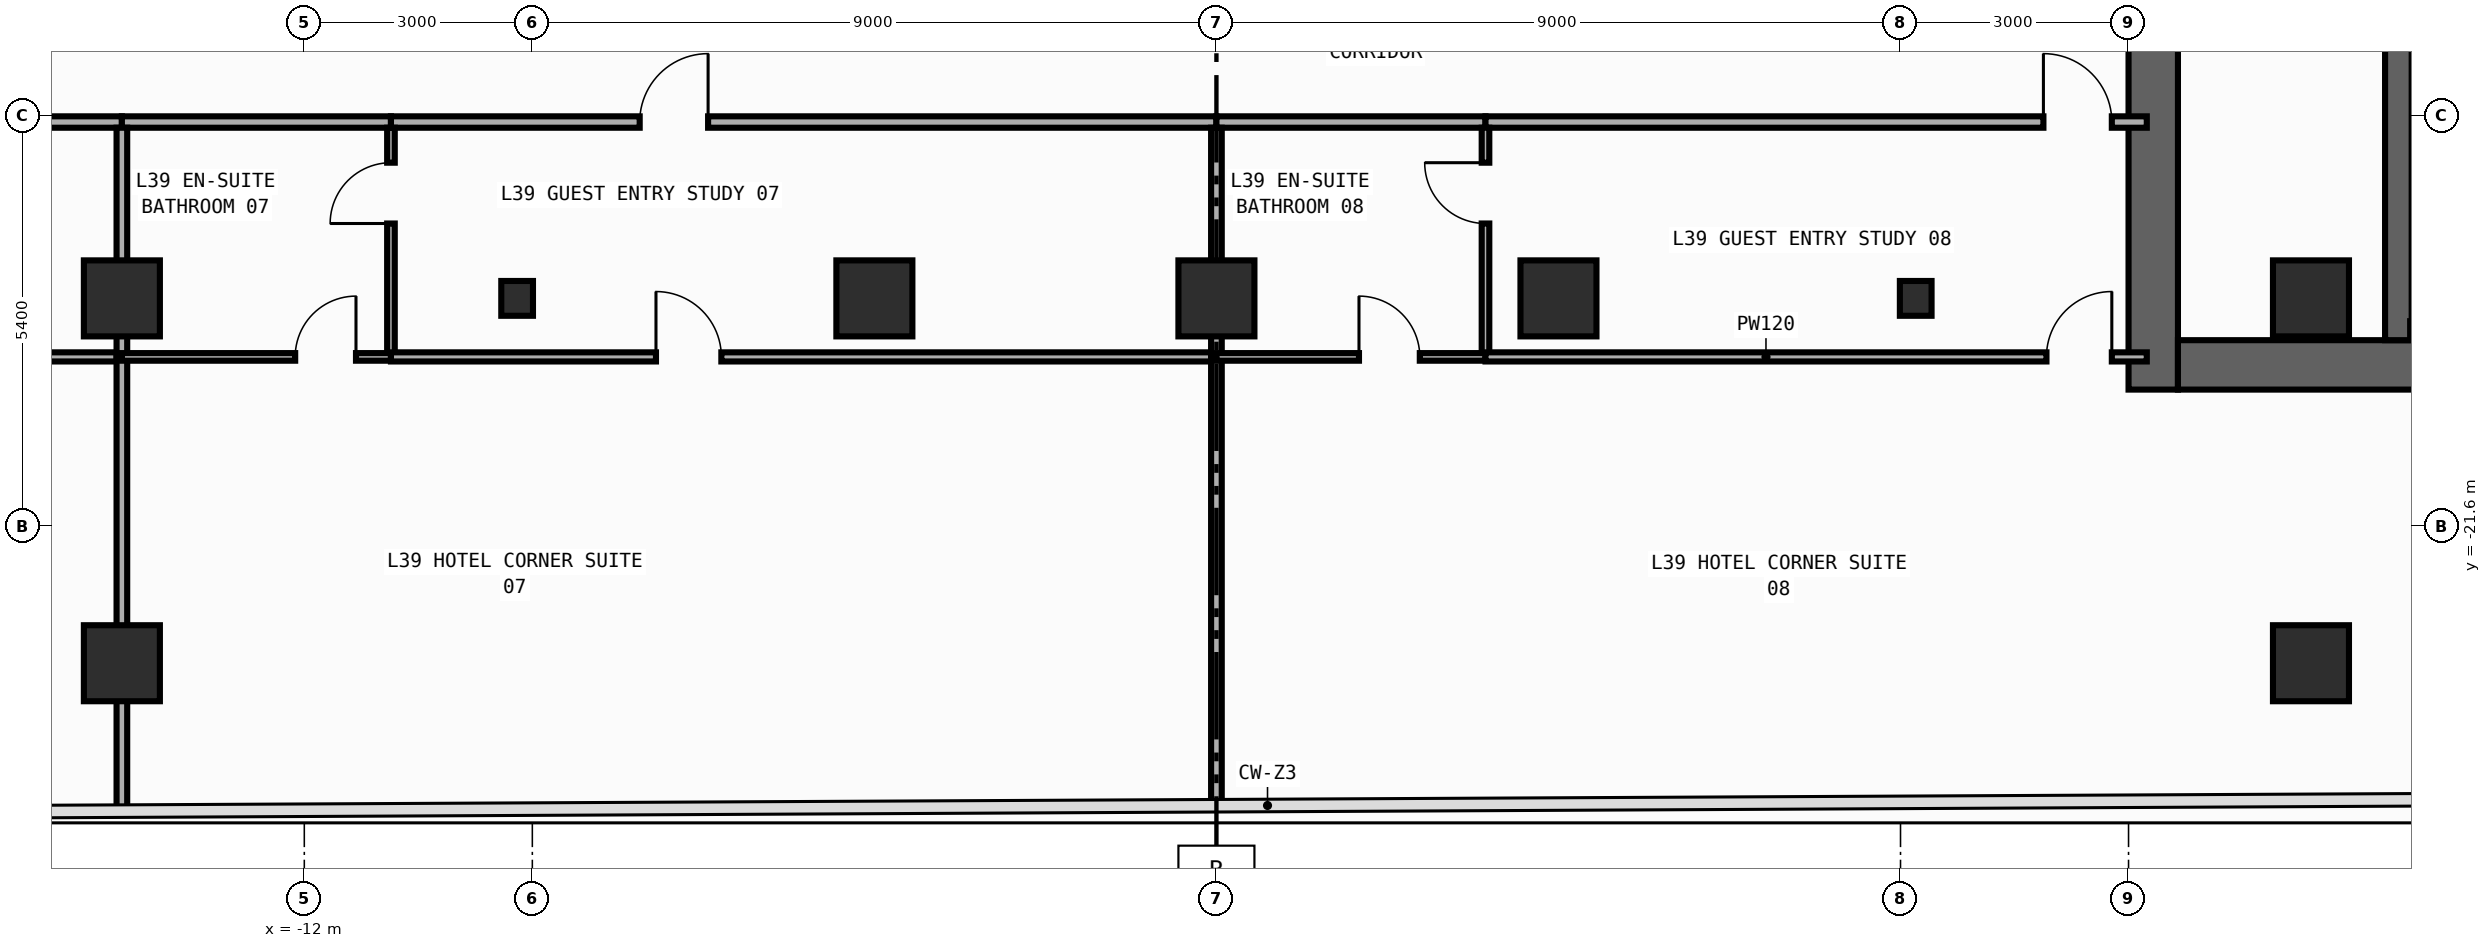
"""IFC4 building model, lengths in metres.
Left out: names, types, materials, properties, quantities, classifications, styles, units other than length and angle.
Written with IfcOpenShell. Run it as: python <this file> out.ifc"""

import sys

from ifc_helpers import new_model, si_unit, direction, frame, frame_2d, origin, origin_2d, place, context, subcontext, project, spatial, rectangle, i_section, extrude, element, fill, save


model = new_model("IFC4")
c1 = context("Model", 3, precision=1e-05, world=origin(), true_north=direction((0.0, 1.0)))
c2 = subcontext(c1, "Body", "Model", "MODEL_VIEW")
j1 = project(units=[si_unit("LENGTHUNIT", "METRE"), si_unit("PLANEANGLEUNIT", "RADIAN")], contexts=[c1])
p1 = place(None, origin())
s1 = spatial("IfcSite", under=j1, at=p1, CompositionType="ELEMENT")
p2 = place(p1, origin())
s2 = spatial("IfcBuilding", under=s1, at=p2, CompositionType="ELEMENT")
p3 = place(p2, frame((0.0, 0.0, 172.6)))
s3 = spatial("IfcBuildingStorey", under=s2, at=p3, CompositionType="ELEMENT", Elevation=172.6)
p4 = place(p3, frame((12.325, -19.8, 0.0), z_axis=(0.0, 0.0, 1.0), x_axis=(0.0, 1.0, 0.0)))
e1 = element("IfcWall", 1, at=p4, inside=s3, PredefinedType="SHEAR", context=c2, shape_type="SweptSolid", body=[
    extrude(rectangle(XDim=27.0, YDim=0.65, at=frame_2d((13.5, 0.0))), origin(), (0.0, 0.0, 1.0), 3.54),
])
p5 = place(p4, frame((23.05, 0.0, 0.0)))
e2 = element("IfcOpeningElement", 2, at=p5, cuts=e1, PredefinedType="OPENING", context=c2, shape_type="SweptSolid", body=[
    extrude(rectangle(XDim=1.1, YDim=2.2, at=frame_2d((0.55, 1.1))), frame((0.0, 0.335, 0.0), z_axis=(0.0, -1.0, 0.0), x_axis=(1.0, 0.0, 0.0)), (0.0, 0.0, 1.0), 0.67),
])
p6 = place(p4, frame((19.85, 0.0, 0.0)))
e3 = element("IfcOpeningElement", 3, at=p6, cuts=e1, PredefinedType="OPENING", context=c2, shape_type="SweptSolid", body=[
    extrude(rectangle(XDim=1.1, YDim=2.2, at=frame_2d((0.55, 1.1))), frame((0.0, 0.335, 0.0), z_axis=(0.0, -1.0, 0.0), x_axis=(1.0, 0.0, 0.0)), (0.0, 0.0, 1.0), 0.67),
])
p7 = place(p4, frame((16.65, 0.0, 0.0)))
e4 = element("IfcOpeningElement", 4, at=p7, cuts=e1, PredefinedType="OPENING", context=c2, shape_type="SweptSolid", body=[
    extrude(rectangle(XDim=1.1, YDim=2.2, at=frame_2d((0.55, 1.1))), frame((0.0, 0.335, 0.0), z_axis=(0.0, -1.0, 0.0), x_axis=(1.0, 0.0, 0.0)), (0.0, 0.0, 1.0), 0.67),
])
p8 = place(p4, frame((10.175, 0.0, 0.0)))
e5 = element("IfcOpeningElement", 5, at=p8, cuts=e1, PredefinedType="OPENING", context=c2, shape_type="SweptSolid", body=[
    extrude(rectangle(XDim=0.85, YDim=2.1, at=frame_2d((0.425, 1.05))), frame((0.0, 0.335, 0.0), z_axis=(0.0, -1.0, 0.0), x_axis=(1.0, 0.0, 0.0)), (0.0, 0.0, 1.0), 0.67),
])
p9 = place(p4, frame((12.725, 0.0, 0.0)))
e6 = element("IfcOpeningElement", 6, at=p9, cuts=e1, PredefinedType="OPENING", context=c2, shape_type="SweptSolid", body=[
    extrude(rectangle(XDim=1.15, YDim=2.2, at=frame_2d((0.575, 1.1))), frame((0.0, 0.335, 0.0), z_axis=(0.0, -1.0, 0.0), x_axis=(1.0, 0.0, 0.0)), (0.0, 0.0, 1.0), 0.67),
])
p10 = place(p4, frame((25.125, 0.0, 0.0)))
e7 = element("IfcOpeningElement", 7, at=p10, cuts=e1, PredefinedType="OPENING", context=c2, shape_type="SweptSolid", body=[
    extrude(rectangle(XDim=0.85, YDim=2.1, at=frame_2d((0.425, 1.05))), frame((0.0, 0.335, 0.0), z_axis=(0.0, -1.0, 0.0), x_axis=(1.0, 0.0, 0.0)), (0.0, 0.0, 1.0), 0.67),
])
p11 = place(p3, frame((12.65, -19.475, 0.0), z_axis=(0.0, 0.0, 1.0), x_axis=(1.0, 0.0, 0.0)))
e8 = element("IfcWall", 8, at=p11, inside=s3, PredefinedType="SHEAR", context=c2, shape_type="SweptSolid", body=[
    extrude(rectangle(XDim=7.1, YDim=0.65, at=frame_2d((3.55, 0.0))), origin(), (0.0, 0.0, 1.0), 3.54),
])
p12 = place(p3, frame((15.55, -19.15, 0.0), z_axis=(0.0, 0.0, 1.0), x_axis=(0.0, 1.0, 0.0)))
e9 = element("IfcWall", 9, at=p12, inside=s3, PredefinedType="SHEAR", context=c2, shape_type="SweptSolid", body=[
    extrude(rectangle(XDim=25.7, YDim=0.35, at=frame_2d((12.85, 0.0))), origin(), (0.0, 0.0, 1.0), 3.54),
])
p13 = place(p12, frame((12.075, 0.0, 0.0)))
e10 = element("IfcOpeningElement", 10, at=p13, cuts=e9, PredefinedType="OPENING", context=c2, shape_type="SweptSolid", body=[
    extrude(rectangle(XDim=1.15, YDim=2.2, at=frame_2d((0.575, 1.1))), frame((0.0, 0.185, 0.0), z_axis=(0.0, -1.0, 0.0), x_axis=(1.0, 0.0, 0.0)), (0.0, 0.0, 1.0), 0.37),
])
p14 = place(p12, frame((24.475, 0.0, 0.0)))
e11 = element("IfcOpeningElement", 11, at=p14, cuts=e9, PredefinedType="OPENING", context=c2, shape_type="SweptSolid", body=[
    extrude(rectangle(XDim=0.85, YDim=2.1, at=frame_2d((0.425, 1.05))), frame((0.0, 0.185, 0.0), z_axis=(0.0, -1.0, 0.0), x_axis=(1.0, 0.0, 0.0)), (0.0, 0.0, 1.0), 0.37),
])
p15 = place(p3, frame((15.705, -19.01, 0.0), z_axis=(0.0, 0.0, 1.0), x_axis=(1.0, 0.0, 0.0)))
e12 = element("IfcWall", 12, at=p15, inside=s3, PredefinedType="SHEAR", context=c2, shape_type="SweptSolid", body=[
    extrude(rectangle(XDim=4.065, YDim=0.22, at=frame_2d((2.032, 0.0))), origin(), (0.0, 0.0, 1.0), 3.54),
])
for number, where, z_axis, x_axis in (
    (13, (-9.2, -18.6, 0.0), (0.0, 0.0, 1.0), (1.0, 0.0, 0.0)),
    (14, (9.2, -18.6, 0.0), (0.0, 0.0, 1.0), (1.0, 0.0, 0.0)),
):
    element("IfcColumn", number, at=place(p3, frame(where, z_axis=z_axis, x_axis=x_axis)), inside=s3, PredefinedType="COLUMN", context=c2, shape_type="SweptSolid", body=[
        extrude(i_section(OverallWidth=0.417, OverallDepth=0.458, WebThickness=0.03, FlangeThickness=0.05, FilletRadius=0.022, at=origin_2d()), origin(), (0.0, 0.0, 1.0), 3.8),
    ])
for number, where, z_axis, x_axis in (
    (15, (-14.4, -18.6, 0.0), (0.0, 0.0, 1.0), (1.0, 0.0, 0.0)),
    (16, (14.4, -18.6, 0.0), (0.0, 0.0, 1.0), (1.0, 0.0, 0.0)),
    (17, (-4.5, -18.6, 0.0), (0.0, 0.0, 1.0), (1.0, 0.0, 0.0)),
    (18, (0.0, -18.6, 0.0), (0.0, 0.0, 1.0), (1.0, 0.0, 0.0)),
    (19, (4.5, -18.6, 0.0), (0.0, 0.0, 1.0), (1.0, 0.0, 0.0)),
    (20, (-14.4, -23.4, 0.0), (0.0, 0.0, 1.0), (1.0, 0.0, 0.0)),
    (21, (14.4, -23.4, 0.0), (0.0, 0.0, 1.0), (1.0, 0.0, 0.0)),
):
    element("IfcColumn", number, at=place(p3, frame(where, z_axis=z_axis, x_axis=x_axis)), inside=s3, PredefinedType="COLUMN", context=c2, shape_type="SweptSolid", body=[
        extrude(rectangle(XDim=1.0, YDim=1.0, at=origin_2d()), origin(), (0.0, 0.0, 1.0), 3.8),
    ])
p16 = place(p3, frame((-18.764, -16.28, 0.0), z_axis=(0.0, 0.0, 1.0), x_axis=(1.0, 0.0, 0.0)))
e22 = element("IfcWall", 22, at=p16, inside=s3, PredefinedType="PARTITIONING", context=c2, shape_type="SweptSolid", body=[
    extrude(rectangle(XDim=4.364, YDim=0.15, at=frame_2d((2.182, 0.0))), origin(), (0.0, 0.0, 1.0), 3.54),
])
p17 = place(p16, frame((0.884, 0.0, 0.0)))
e23 = element("IfcOpeningElement", 23, at=p17, cuts=e22, PredefinedType="OPENING", context=c2, shape_type="SweptSolid", body=[
    extrude(rectangle(XDim=0.9, YDim=2.15, at=frame_2d((0.45, 1.075))), frame((0.0, 0.085, 0.0), z_axis=(0.0, -1.0, 0.0), x_axis=(1.0, 0.0, 0.0)), (0.0, 0.0, 1.0), 0.17),
])
p18 = place(p3, frame((-14.4, -16.28, 0.0), z_axis=(0.0, 0.0, 1.0), x_axis=(1.0, 0.0, 0.0)))
e24 = element("IfcWall", 24, at=p18, inside=s3, PredefinedType="PARTITIONING", context=c2, shape_type="SweptSolid", body=[
    extrude(rectangle(XDim=3.54, YDim=0.15, at=frame_2d((1.77, 0.0))), origin(), (0.0, 0.0, 1.0), 3.54),
])
p19 = place(p3, frame((-10.86, -16.28, 0.0), z_axis=(0.0, 0.0, 1.0), x_axis=(1.0, 0.0, 0.0)))
e25 = element("IfcWall", 25, at=p19, inside=s3, PredefinedType="PARTITIONING", context=c2, shape_type="SweptSolid", body=[
    extrude(rectangle(XDim=10.86, YDim=0.15, at=frame_2d((5.43, 0.0))), origin(), (0.0, 0.0, 1.0), 3.54),
])
p20 = place(p19, frame((3.272, 0.0, 0.0)))
e26 = element("IfcOpeningElement", 26, at=p20, cuts=e25, PredefinedType="OPENING", context=c2, shape_type="SweptSolid", body=[
    extrude(rectangle(XDim=0.9, YDim=2.15, at=frame_2d((0.45, 1.075))), frame((0.0, 0.085, 0.0), z_axis=(0.0, -1.0, 0.0), x_axis=(1.0, 0.0, 0.0)), (0.0, 0.0, 1.0), 0.17),
])
p21 = place(p3, frame((0.0, -16.28, 0.0), z_axis=(0.0, 0.0, 1.0), x_axis=(1.0, 0.0, 0.0)))
e27 = element("IfcWall", 27, at=p21, inside=s3, PredefinedType="PARTITIONING", context=c2, shape_type="SweptSolid", body=[
    extrude(rectangle(XDim=3.54, YDim=0.15, at=frame_2d((1.77, 0.0))), origin(), (0.0, 0.0, 1.0), 3.54),
])
p22 = place(p3, frame((3.54, -16.28, 0.0), z_axis=(0.0, 0.0, 1.0), x_axis=(1.0, 0.0, 0.0)))
e28 = element("IfcWall", 28, at=p22, inside=s3, PredefinedType="PARTITIONING", context=c2, shape_type="SweptSolid", body=[
    extrude(rectangle(XDim=8.7, YDim=0.15, at=frame_2d((4.35, 0.0))), origin(), (0.0, 0.0, 1.0), 3.54),
])
p23 = place(p22, frame((7.34, 0.0, 0.0)))
e29 = element("IfcOpeningElement", 29, at=p23, cuts=e28, PredefinedType="OPENING", context=c2, shape_type="SweptSolid", body=[
    extrude(rectangle(XDim=0.9, YDim=2.15, at=frame_2d((0.45, 1.075))), frame((0.0, 0.085, 0.0), z_axis=(0.0, -1.0, 0.0), x_axis=(1.0, 0.0, 0.0)), (0.0, 0.0, 1.0), 0.17),
])
p24 = place(p3, frame((-18.764, -19.37, 0.0), z_axis=(0.0, 0.0, 1.0), x_axis=(1.0, 0.0, 0.0)))
e30 = element("IfcWall", 30, at=p24, inside=s3, PredefinedType="PARTITIONING", context=c2, shape_type="SweptSolid", body=[
    extrude(rectangle(XDim=4.364, YDim=0.12, at=frame_2d((2.182, 0.0))), origin(), (0.0, 0.0, 1.0), 3.54),
])
p25 = place(p24, frame((0.891, 0.0, 0.0)))
e31 = element("IfcOpeningElement", 31, at=p25, cuts=e30, PredefinedType="OPENING", context=c2, shape_type="SweptSolid", body=[
    extrude(rectangle(XDim=0.86, YDim=2.15, at=frame_2d((0.43, 1.075))), frame((0.0, 0.07, 0.0), z_axis=(0.0, -1.0, 0.0), x_axis=(1.0, 0.0, 0.0)), (0.0, 0.0, 1.0), 0.14),
])
p26 = place(p3, frame((-14.4, -19.37, 0.0), z_axis=(0.0, 0.0, 1.0), x_axis=(0.0, 1.0, 0.0)))
e32 = element("IfcWall", 32, at=p26, inside=s3, PredefinedType="PARTITIONING", context=c2, shape_type="SweptSolid", body=[
    extrude(rectangle(XDim=3.015, YDim=0.14, at=frame_2d((1.508, 0.0))), origin(), (0.0, 0.0, 1.0), 2.952),
])
p27 = place(p3, frame((-14.4, -25.341, 0.0), z_axis=(0.0, 0.0, 1.0), x_axis=(0.0, 1.0, 0.0)))
e33 = element("IfcWall", 33, at=p27, inside=s3, PredefinedType="PARTITIONING", context=c2, shape_type="SweptSolid", body=[
    extrude(rectangle(XDim=5.971, YDim=0.14, at=frame_2d((2.985, 0.0))), origin(), (0.0, 0.0, 1.0), 2.952),
])
p28 = place(p3, frame((-10.86, -19.32, 0.0), z_axis=(0.0, 0.0, 1.0), x_axis=(0.0, 1.0, 0.0)))
e34 = element("IfcWall", 34, at=p28, inside=s3, PredefinedType="PARTITIONING", context=c2, shape_type="SweptSolid", body=[
    extrude(rectangle(XDim=2.965, YDim=0.1, at=frame_2d((1.482, 0.0))), origin(), (0.0, 0.0, 1.0), 3.54),
])
p29 = place(p28, frame((1.705, 0.0, 0.0)))
e35 = element("IfcOpeningElement", 35, at=p29, cuts=e34, PredefinedType="OPENING", context=c2, shape_type="SweptSolid", body=[
    extrude(rectangle(XDim=0.8, YDim=2.1, at=frame_2d((0.4, 1.05))), frame((0.0, 0.06, 0.0), z_axis=(0.0, -1.0, 0.0), x_axis=(1.0, 0.0, 0.0)), (0.0, 0.0, 1.0), 0.12),
])
p30 = place(p3, frame((-14.4, -19.37, 0.0), z_axis=(0.0, 0.0, 1.0), x_axis=(1.0, 0.0, 0.0)))
e36 = element("IfcWall", 36, at=p30, inside=s3, PredefinedType="PARTITIONING", context=c2, shape_type="SweptSolid", body=[
    extrude(rectangle(XDim=3.54, YDim=0.1, at=frame_2d((1.77, 0.0))), origin(), (0.0, 0.0, 1.0), 3.54),
])
p31 = place(p30, frame((2.28, 0.0, 0.0)))
e37 = element("IfcOpeningElement", 37, at=p31, cuts=e36, PredefinedType="OPENING", context=c2, shape_type="SweptSolid", body=[
    extrude(rectangle(XDim=0.8, YDim=2.1, at=frame_2d((0.4, 1.05))), frame((0.0, 0.06, 0.0), z_axis=(0.0, -1.0, 0.0), x_axis=(1.0, 0.0, 0.0)), (0.0, 0.0, 1.0), 0.12),
])
p32 = place(p3, frame((-10.86, -19.37, 0.0), z_axis=(0.0, 0.0, 1.0), x_axis=(1.0, 0.0, 0.0)))
e38 = element("IfcWall", 38, at=p32, inside=s3, PredefinedType="PARTITIONING", context=c2, shape_type="SweptSolid", body=[
    extrude(rectangle(XDim=10.86, YDim=0.12, at=frame_2d((5.43, 0.0))), origin(), (0.0, 0.0, 1.0), 3.54),
])
p33 = place(p32, frame((3.487, 0.0, 0.0)))
e39 = element("IfcOpeningElement", 39, at=p33, cuts=e38, PredefinedType="OPENING", context=c2, shape_type="SweptSolid", body=[
    extrude(rectangle(XDim=0.86, YDim=2.15, at=frame_2d((0.43, 1.075))), frame((0.0, 0.07, 0.0), z_axis=(0.0, -1.0, 0.0), x_axis=(1.0, 0.0, 0.0)), (0.0, 0.0, 1.0), 0.14),
])
p34 = place(p3, frame((0.0, -19.37, 0.0), z_axis=(0.0, 0.0, 1.0), x_axis=(0.0, 1.0, 0.0)))
e40 = element("IfcWall", 40, at=p34, inside=s3, PredefinedType="PARTITIONING", context=c2, shape_type="SweptSolid", body=[
    extrude(rectangle(XDim=3.015, YDim=0.14, at=frame_2d((1.508, 0.0))), origin(), (0.0, 0.0, 1.0), 3.54),
])
p35 = place(p3, frame((0.0, -25.27, 0.0), z_axis=(0.0, 0.0, 1.0), x_axis=(0.0, 1.0, 0.0)))
e41 = element("IfcWall", 41, at=p35, inside=s3, PredefinedType="PARTITIONING", context=c2, shape_type="SweptSolid", body=[
    extrude(rectangle(XDim=5.9, YDim=0.14, at=frame_2d((2.95, 0.0))), origin(), (0.0, 0.0, 1.0), 3.54),
])
p36 = place(p3, frame((3.54, -19.32, 0.0), z_axis=(0.0, 0.0, 1.0), x_axis=(0.0, 1.0, 0.0)))
e42 = element("IfcWall", 42, at=p36, inside=s3, PredefinedType="PARTITIONING", context=c2, shape_type="SweptSolid", body=[
    extrude(rectangle(XDim=2.965, YDim=0.1, at=frame_2d((1.482, 0.0))), origin(), (0.0, 0.0, 1.0), 3.54),
])
p37 = place(p36, frame((1.705, 0.0, 0.0)))
e43 = element("IfcOpeningElement", 43, at=p37, cuts=e42, PredefinedType="OPENING", context=c2, shape_type="SweptSolid", body=[
    extrude(rectangle(XDim=0.8, YDim=2.1, at=frame_2d((0.4, 1.05))), frame((0.0, 0.06, 0.0), z_axis=(0.0, -1.0, 0.0), x_axis=(1.0, 0.0, 0.0)), (0.0, 0.0, 1.0), 0.12),
])
p38 = place(p3, frame((0.0, -19.37, 0.0), z_axis=(0.0, 0.0, 1.0), x_axis=(1.0, 0.0, 0.0)))
e44 = element("IfcWall", 44, at=p38, inside=s3, PredefinedType="PARTITIONING", context=c2, shape_type="SweptSolid", body=[
    extrude(rectangle(XDim=3.54, YDim=0.1, at=frame_2d((1.77, 0.0))), origin(), (0.0, 0.0, 1.0), 3.54),
])
p39 = place(p38, frame((1.875, 0.0, 0.0)))
e45 = element("IfcOpeningElement", 45, at=p39, cuts=e44, PredefinedType="OPENING", context=c2, shape_type="SweptSolid", body=[
    extrude(rectangle(XDim=0.8, YDim=2.1, at=frame_2d((0.4, 1.05))), frame((0.0, 0.06, 0.0), z_axis=(0.0, -1.0, 0.0), x_axis=(1.0, 0.0, 0.0)), (0.0, 0.0, 1.0), 0.12),
])
p40 = place(p3, frame((3.54, -19.37, 0.0), z_axis=(0.0, 0.0, 1.0), x_axis=(1.0, 0.0, 0.0)))
e46 = element("IfcWall", 46, at=p40, inside=s3, PredefinedType="PARTITIONING", context=c2, shape_type="SweptSolid", body=[
    extrude(rectangle(XDim=8.7, YDim=0.12, at=frame_2d((4.35, 0.0))), origin(), (0.0, 0.0, 1.0), 3.54),
])
p41 = place(p40, frame((7.38, 0.0, 0.0)))
e47 = element("IfcOpeningElement", 47, at=p41, cuts=e46, PredefinedType="OPENING", context=c2, shape_type="SweptSolid", body=[
    extrude(rectangle(XDim=0.86, YDim=2.15, at=frame_2d((0.43, 1.075))), frame((0.0, 0.07, 0.0), z_axis=(0.0, -1.0, 0.0), x_axis=(1.0, 0.0, 0.0)), (0.0, 0.0, 1.0), 0.14),
])
p42 = place(p20, origin())
e48 = element("IfcDoor", 48, at=p42, inside=s3, OperationType="SINGLE_SWING_RIGHT", PredefinedType="DOOR", context=c2, shape_type="SweptSolid", body=[
    extrude(rectangle(XDim=0.9, YDim=2.15, at=frame_2d((0.45, 1.075))), frame((0.0, 0.025, 0.0), z_axis=(0.0, -1.0, 0.0), x_axis=(1.0, 0.0, 0.0)), (0.0, 0.0, 1.0), 0.05),
])
fill(e26, e48)
p43 = place(p23, origin())
e49 = element("IfcDoor", 49, at=p43, inside=s3, OperationType="SINGLE_SWING_LEFT", PredefinedType="DOOR", context=c2, shape_type="SweptSolid", body=[
    extrude(rectangle(XDim=0.9, YDim=2.15, at=frame_2d((0.45, 1.075))), frame((0.0, 0.025, 0.0), z_axis=(0.0, -1.0, 0.0), x_axis=(1.0, 0.0, 0.0)), (0.0, 0.0, 1.0), 0.05),
])
fill(e29, e49)
p44 = place(p29, origin())
e50 = element("IfcDoor", 50, at=p44, inside=s3, OperationType="SINGLE_SWING_LEFT", PredefinedType="DOOR", context=c2, shape_type="SweptSolid", body=[
    extrude(rectangle(XDim=0.8, YDim=2.1, at=frame_2d((0.4, 1.05))), frame((0.0, 0.025, 0.0), z_axis=(0.0, -1.0, 0.0), x_axis=(1.0, 0.0, 0.0)), (0.0, 0.0, 1.0), 0.05),
])
fill(e35, e50)
p45 = place(p31, origin())
e51 = element("IfcDoor", 51, at=p45, inside=s3, OperationType="SINGLE_SWING_RIGHT", PredefinedType="DOOR", context=c2, shape_type="SweptSolid", body=[
    extrude(rectangle(XDim=0.8, YDim=2.1, at=frame_2d((0.4, 1.05))), frame((0.0, 0.025, 0.0), z_axis=(0.0, -1.0, 0.0), x_axis=(1.0, 0.0, 0.0)), (0.0, 0.0, 1.0), 0.05),
])
fill(e37, e51)
p46 = place(p33, origin())
e52 = element("IfcDoor", 52, at=p46, inside=s3, OperationType="SINGLE_SWING_LEFT", PredefinedType="DOOR", context=c2, shape_type="SweptSolid", body=[
    extrude(rectangle(XDim=0.86, YDim=2.15, at=frame_2d((0.43, 1.075))), frame((0.0, 0.025, 0.0), z_axis=(0.0, -1.0, 0.0), x_axis=(1.0, 0.0, 0.0)), (0.0, 0.0, 1.0), 0.05),
])
fill(e39, e52)
p47 = place(p37, origin())
e53 = element("IfcDoor", 53, at=p47, inside=s3, OperationType="SINGLE_SWING_RIGHT", PredefinedType="DOOR", context=c2, shape_type="SweptSolid", body=[
    extrude(rectangle(XDim=0.8, YDim=2.1, at=frame_2d((0.4, 1.05))), frame((0.0, 0.025, 0.0), z_axis=(0.0, -1.0, 0.0), x_axis=(1.0, 0.0, 0.0)), (0.0, 0.0, 1.0), 0.05),
])
fill(e43, e53)
p48 = place(p39, origin())
e54 = element("IfcDoor", 54, at=p48, inside=s3, OperationType="SINGLE_SWING_LEFT", PredefinedType="DOOR", context=c2, shape_type="SweptSolid", body=[
    extrude(rectangle(XDim=0.8, YDim=2.1, at=frame_2d((0.4, 1.05))), frame((0.0, 0.025, 0.0), z_axis=(0.0, -1.0, 0.0), x_axis=(1.0, 0.0, 0.0)), (0.0, 0.0, 1.0), 0.05),
])
fill(e45, e54)
p49 = place(p41, origin())
e55 = element("IfcDoor", 55, at=p49, inside=s3, OperationType="SINGLE_SWING_RIGHT", PredefinedType="DOOR", context=c2, shape_type="SweptSolid", body=[
    extrude(rectangle(XDim=0.86, YDim=2.15, at=frame_2d((0.43, 1.075))), frame((0.0, 0.025, 0.0), z_axis=(0.0, -1.0, 0.0), x_axis=(1.0, 0.0, 0.0)), (0.0, 0.0, 1.0), 0.05),
])
fill(e47, e55)
save(model, sys.argv[1])
